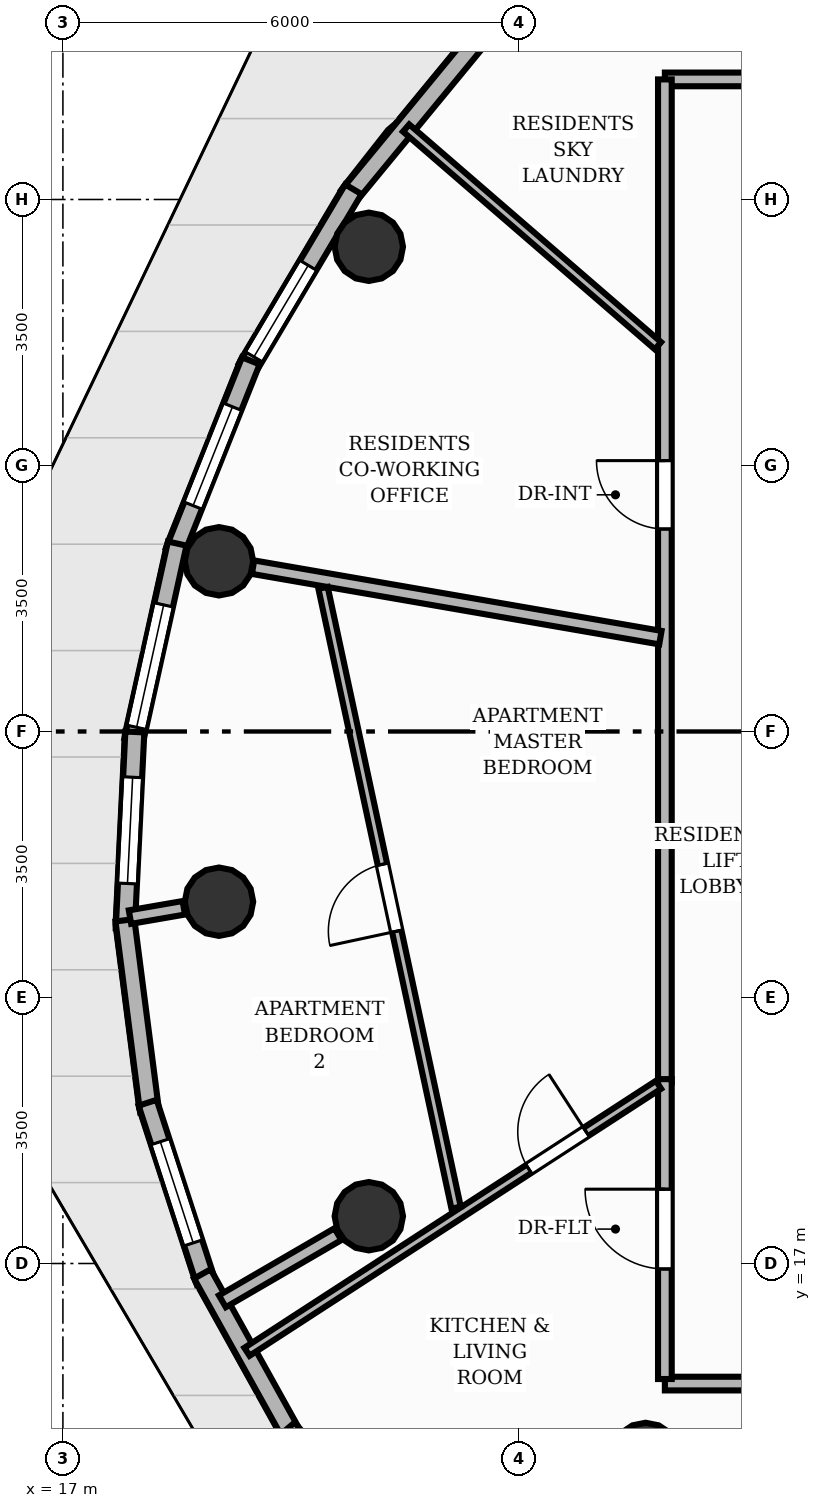
"""IFC4 building model, lengths in metres.
Left out: names, types, materials, properties, quantities, classifications, styles, units other than length and angle.
Written with IfcOpenShell. Run it as: python <this file> out.ifc"""

import sys

from ifc_helpers import new_model, si_unit, direction, frame, frame_2d, origin, origin_2d, place, context, subcontext, project, spatial, rectangle, circle, extrude, element, fill, save


model = new_model("IFC4")
c1 = context("Model", 3, precision=1e-05, world=origin(), true_north=direction((0.0, 1.0)))
c2 = subcontext(c1, "Body", "Model", "MODEL_VIEW")
j1 = project(units=[si_unit("LENGTHUNIT", "METRE"), si_unit("PLANEANGLEUNIT", "RADIAN")], contexts=[c1])
p1 = place(None, origin())
s1 = spatial("IfcSite", under=j1, at=p1, CompositionType="ELEMENT")
p2 = place(p1, origin())
s2 = spatial("IfcBuilding", under=s1, at=p2, CompositionType="ELEMENT")
p3 = place(p2, frame((0.0, 0.0, 191.84)))
s3 = spatial("IfcBuildingStorey", under=s2, at=p3, CompositionType="ELEMENT", Elevation=191.84)
for number, where, z_axis, x_axis in (
    (1, (21.025, 30.378, 0.0), (0.0, 0.0, 1.0), (1.0, 0.0, 0.0)),
    (2, (19.054, 26.24, 0.0), (0.0, 0.0, 1.0), (1.0, 0.0, 0.0)),
    (3, (19.054, 21.76, 0.0), (0.0, 0.0, 1.0), (1.0, 0.0, 0.0)),
    (4, (21.025, 17.622, 0.0), (0.0, 0.0, 1.0), (1.0, 0.0, 0.0)),
    (5, (24.667, 14.455, 0.0), (0.0, 0.0, 1.0), (1.0, 0.0, 0.0)),
):
    element("IfcColumn", number, at=place(p3, frame(where, z_axis=z_axis, x_axis=x_axis)), inside=s3, PredefinedType="COLUMN", context=c2, shape_type="SweptSolid", body=[
        extrude(circle(Radius=0.45, at=origin_2d()), origin(), (0.0, 0.0, 1.0), 3.2),
    ])
p4 = place(p3, frame((20.759, 31.045, 0.0), z_axis=(0.0, 0.0, 1.0), x_axis=(0.635409334306, 0.772175483861, 0.0)))
e6 = element("IfcWall", 6, at=p4, inside=s3, PredefinedType="SOLIDWALL", context=c2, shape_type="SweptSolid", body=[
    extrude(rectangle(XDim=2.758, YDim=0.25, at=frame_2d((1.379, 0.0))), origin(), (0.0, 0.0, 1.0), 2.96),
])
p5 = place(p3, frame((19.424, 28.779, 0.0), z_axis=(0.0, 0.0, 1.0), x_axis=(0.510320389621, 0.859984360287, 0.0)))
e7 = element("IfcWall", 7, at=p5, inside=s3, PredefinedType="SOLIDWALL", context=c2, shape_type="SweptSolid", body=[
    extrude(rectangle(XDim=2.738, YDim=0.25, at=frame_2d((1.369, 0.0))), origin(), (0.0, 0.0, 1.0), 2.96),
])
p6 = place(p5, frame((0.175, 0.0, 0.85)))
e8 = element("IfcOpeningElement", 8, at=p6, cuts=e7, PredefinedType="OPENING", context=c2, shape_type="SweptSolid", body=[
    extrude(rectangle(XDim=1.4, YDim=1.55, at=frame_2d((0.7, 0.775))), frame((0.0, 0.135, 0.0), z_axis=(0.0, -1.0, 0.0), x_axis=(1.0, 0.0, 0.0)), (0.0, 0.0, 1.0), 0.27),
])
p7 = place(p3, frame((18.472, 26.367, 0.0), z_axis=(0.0, 0.0, 1.0), x_axis=(0.370330939431, 0.928899884433, 0.0)))
e9 = element("IfcWall", 9, at=p7, inside=s3, PredefinedType="SOLIDWALL", context=c2, shape_type="SweptSolid", body=[
    extrude(rectangle(XDim=2.702, YDim=0.25, at=frame_2d((1.351, 0.0))), origin(), (0.0, 0.0, 1.0), 2.96),
])
p8 = place(p7, frame((0.651, 0.0, 0.85)))
e10 = element("IfcOpeningElement", 10, at=p8, cuts=e9, PredefinedType="OPENING", context=c2, shape_type="SweptSolid", body=[
    extrude(rectangle(XDim=1.4, YDim=1.55, at=frame_2d((0.7, 0.775))), frame((0.0, 0.135, 0.0), z_axis=(0.0, -1.0, 0.0), x_axis=(1.0, 0.0, 0.0)), (0.0, 0.0, 1.0), 0.27),
])
p9 = place(p3, frame((17.932, 23.884, 0.0), z_axis=(0.0, 0.0, 1.0), x_axis=(0.215877166516, 0.976420528756, 0.0)))
e11 = element("IfcWall", 11, at=p9, inside=s3, PredefinedType="SOLIDWALL", context=c2, shape_type="SweptSolid", body=[
    extrude(rectangle(XDim=2.651, YDim=0.25, at=frame_2d((1.325, 0.0))), origin(), (0.0, 0.0, 1.0), 2.96),
])
p10 = place(p9, frame((0.175, 0.0, 0.85)))
e12 = element("IfcOpeningElement", 12, at=p10, cuts=e11, PredefinedType="OPENING", context=c2, shape_type="SweptSolid", body=[
    extrude(rectangle(XDim=1.65, YDim=1.55, at=frame_2d((0.825, 0.775))), frame((0.0, 0.135, 0.0), z_axis=(0.0, -1.0, 0.0), x_axis=(1.0, 0.0, 0.0)), (0.0, 0.0, 1.0), 0.27),
])
p11 = place(p3, frame((17.82, 21.405, 0.0), z_axis=(0.0, 0.0, 1.0), x_axis=(0.048688181414, 0.99881402723, 0.0)))
e13 = element("IfcWall", 13, at=p11, inside=s3, PredefinedType="SOLIDWALL", context=c2, shape_type="SweptSolid", body=[
    extrude(rectangle(XDim=2.593, YDim=0.25, at=frame_2d((1.296, 0.0))), origin(), (0.0, 0.0, 1.0), 2.96),
])
p12 = place(p11, frame((0.596, 0.0, 0.85)))
e14 = element("IfcOpeningElement", 14, at=p12, cuts=e13, PredefinedType="OPENING", context=c2, shape_type="SweptSolid", body=[
    extrude(rectangle(XDim=1.4, YDim=1.55, at=frame_2d((0.7, 0.775))), frame((0.0, 0.135, 0.0), z_axis=(0.0, -1.0, 0.0), x_axis=(1.0, 0.0, 0.0)), (0.0, 0.0, 1.0), 0.27),
])
p13 = place(p3, frame((18.14, 19.005, 0.0), z_axis=(0.0, 0.0, 1.0), x_axis=(-0.128057007482, 0.991766808698, 0.0)))
e15 = element("IfcWall", 15, at=p13, inside=s3, PredefinedType="SOLIDWALL", context=c2, shape_type="SweptSolid", body=[
    extrude(rectangle(XDim=2.532, YDim=0.25, at=frame_2d((1.266, 0.0))), origin(), (0.0, 0.0, 1.0), 2.96),
])
p14 = place(p3, frame((18.881, 16.759, 0.0), z_axis=(0.0, 0.0, 1.0), x_axis=(-0.309005861828, 0.951060133407, 0.0)))
e16 = element("IfcWall", 16, at=p14, inside=s3, PredefinedType="SOLIDWALL", context=c2, shape_type="SweptSolid", body=[
    extrude(rectangle(XDim=2.478, YDim=0.25, at=frame_2d((1.239, 0.0))), origin(), (0.0, 0.0, 1.0), 2.96),
])
p15 = place(p14, frame((0.539, 0.0, 0.85)))
e17 = element("IfcOpeningElement", 17, at=p15, cuts=e16, PredefinedType="OPENING", context=c2, shape_type="SweptSolid", body=[
    extrude(rectangle(XDim=1.4, YDim=1.55, at=frame_2d((0.7, 0.775))), frame((0.0, 0.135, 0.0), z_axis=(0.0, -1.0, 0.0), x_axis=(1.0, 0.0, 0.0)), (0.0, 0.0, 1.0), 0.27),
])
p16 = place(p3, frame((20.019, 14.733, 0.0), z_axis=(0.0, 0.0, 1.0), x_axis=(-0.485821561791, 0.874058013005, 0.0)))
e18 = element("IfcWall", 18, at=p16, inside=s3, PredefinedType="SOLIDWALL", context=c2, shape_type="SweptSolid", body=[
    extrude(rectangle(XDim=2.437, YDim=0.25, at=frame_2d((1.218, 0.0))), origin(), (0.0, 0.0, 1.0), 2.96),
])
p17 = place(p3, frame((21.521, 12.99, 0.0), z_axis=(0.0, 0.0, 1.0), x_axis=(-0.648874307696, 0.760895612297, 0.0)))
e19 = element("IfcWall", 19, at=p17, inside=s3, PredefinedType="SOLIDWALL", context=c2, shape_type="SweptSolid", body=[
    extrude(rectangle(XDim=2.415, YDim=0.25, at=frame_2d((1.208, 0.0))), origin(), (0.0, 0.0, 1.0), 2.96),
])
p18 = place(p17, frame((0.632, 0.0, 0.0)))
e20 = element("IfcOpeningElement", 20, at=p18, cuts=e19, PredefinedType="OPENING", context=c2, shape_type="SweptSolid", body=[
    extrude(rectangle(XDim=1.15, YDim=2.2, at=frame_2d((0.575, 1.1))), frame((0.0, 0.135, 0.0), z_axis=(0.0, -1.0, 0.0), x_axis=(1.0, 0.0, 0.0)), (0.0, 0.0, 1.0), 0.27),
])
p19 = place(p3, frame((18.591, 21.68, 0.0), z_axis=(0.0, 0.0, 1.0), x_axis=(-0.985336223431, -0.170623933826, 0.0)))
e21 = element("IfcWall", 21, at=p19, inside=s3, PredefinedType="PARTITIONING", context=c2, shape_type="SweptSolid", body=[
    extrude(rectangle(XDim=0.718, YDim=0.18, at=frame_2d((0.359, 0.0))), origin(), (0.0, 0.0, 1.0), 2.403),
])
p20 = place(p3, frame((20.618, 17.386, 0.0), z_axis=(0.0, 0.0, 1.0), x_axis=(-0.86461381872, -0.502437005482, 0.0)))
e22 = element("IfcWall", 22, at=p20, inside=s3, PredefinedType="PARTITIONING", context=c2, shape_type="SweptSolid", body=[
    extrude(rectangle(XDim=1.758, YDim=0.18, at=frame_2d((0.879, 0.0))), origin(), (0.0, 0.0, 1.0), 2.403),
])
p21 = place(p3, frame((24.92, 32.58, 0.0), z_axis=(0.0, 0.0, 1.0), x_axis=(1.0, 0.0, 0.0)))
e23 = element("IfcWall", 23, at=p21, inside=s3, PredefinedType="PARTITIONING", context=c2, shape_type="SweptSolid", body=[
    extrude(rectangle(XDim=14.16, YDim=0.18, at=frame_2d((7.08, 0.0))), origin(), (0.0, 0.0, 1.0), 2.955),
])
p22 = place(p21, frame((8.186, 0.0, 0.0)))
e24 = element("IfcOpeningElement", 24, at=p22, cuts=e23, PredefinedType="OPENING", context=c2, shape_type="SweptSolid", body=[
    extrude(rectangle(XDim=1.05, YDim=2.15, at=frame_2d((0.525, 1.075))), frame((0.0, 0.1, 0.0), z_axis=(0.0, -1.0, 0.0), x_axis=(1.0, 0.0, 0.0)), (0.0, 0.0, 1.0), 0.2),
])
p23 = place(p21, frame((2.119, 0.0, 0.0)))
e25 = element("IfcOpeningElement", 25, at=p23, cuts=e23, PredefinedType="OPENING", context=c2, shape_type="SweptSolid", body=[
    extrude(rectangle(XDim=0.9, YDim=2.1, at=frame_2d((0.45, 1.05))), frame((0.0, 0.1, 0.0), z_axis=(0.0, -1.0, 0.0), x_axis=(1.0, 0.0, 0.0)), (0.0, 0.0, 1.0), 0.2),
])
p24 = place(p3, frame((24.92, 19.382, 0.0), z_axis=(0.0, 0.0, 1.0), x_axis=(0.0, 1.0, 0.0)))
e26 = element("IfcWall", 26, at=p24, inside=s3, PredefinedType="PARTITIONING", context=c2, shape_type="SweptSolid", body=[
    extrude(rectangle(XDim=13.198, YDim=0.18, at=frame_2d((6.599, 0.0))), origin(), (0.0, 0.0, 1.0), 2.955),
])
p25 = place(p24, frame((7.282, 0.0, 0.0)))
e27 = element("IfcOpeningElement", 27, at=p25, cuts=e26, PredefinedType="OPENING", context=c2, shape_type="SweptSolid", body=[
    extrude(rectangle(XDim=0.9, YDim=2.1, at=frame_2d((0.45, 1.05))), frame((0.0, 0.1, 0.0), z_axis=(0.0, -1.0, 0.0), x_axis=(1.0, 0.0, 0.0)), (0.0, 0.0, 1.0), 0.2),
])
p26 = place(p3, frame((28.531, 15.42, 0.0), z_axis=(0.0, 0.0, 1.0), x_axis=(-1.0, 0.0, 0.0)))
e28 = element("IfcWall", 28, at=p26, inside=s3, PredefinedType="PARTITIONING", context=c2, shape_type="SweptSolid", body=[
    extrude(rectangle(XDim=3.611, YDim=0.18, at=frame_2d((1.805, 0.0))), origin(), (0.0, 0.0, 1.0), 2.955),
])
p27 = place(p3, frame((24.92, 15.48, 0.0), z_axis=(0.0, 0.0, 1.0), x_axis=(0.0, 1.0, 0.0)))
e29 = element("IfcWall", 29, at=p27, inside=s3, PredefinedType="PARTITIONING", context=c2, shape_type="SweptSolid", body=[
    extrude(rectangle(XDim=3.946, YDim=0.18, at=frame_2d((1.973, 0.0))), origin(), (0.0, 0.0, 1.0), 2.955),
])
p28 = place(p27, frame((1.448, 0.0, 0.0)))
e30 = element("IfcOpeningElement", 30, at=p28, cuts=e29, PredefinedType="OPENING", context=c2, shape_type="SweptSolid", body=[
    extrude(rectangle(XDim=1.05, YDim=2.15, at=frame_2d((0.525, 1.075))), frame((0.0, 0.1, 0.0), z_axis=(0.0, -1.0, 0.0), x_axis=(1.0, 0.0, 0.0)), (0.0, 0.0, 1.0), 0.2),
])
p29 = place(p3, frame((21.515, 31.941, 0.0), z_axis=(0.0, 0.0, 1.0), x_axis=(0.756468247818, -0.654030419815, 0.0)))
e31 = element("IfcWall", 31, at=p29, inside=s3, PredefinedType="PARTITIONING", context=c2, shape_type="SweptSolid", body=[
    extrude(rectangle(XDim=4.381, YDim=0.125, at=frame_2d((2.19, 0.0))), origin(), (0.0, 0.0, 1.0), 2.692),
])
p30 = place(p3, frame((24.861, 25.235, 0.0), z_axis=(0.0, 0.0, 1.0), x_axis=(-0.985368487575, 0.170437506711, 0.0)))
e32 = element("IfcWall", 32, at=p30, inside=s3, PredefinedType="PARTITIONING", context=c2, shape_type="SweptSolid", body=[
    extrude(rectangle(XDim=5.439, YDim=0.18, at=frame_2d((2.719, 0.0))), origin(), (0.0, 0.0, 1.0), 2.403),
])
p31 = place(p3, frame((28.452, 15.339, 0.0), z_axis=(0.0, 0.0, 1.0), x_axis=(-0.583489481732, -0.812120695899, 0.0)))
e33 = element("IfcWall", 33, at=p31, inside=s3, PredefinedType="PLUMBINGWALL", context=c2, shape_type="SweptSolid", body=[
    extrude(rectangle(XDim=5.698, YDim=0.16, at=frame_2d((2.849, 0.0))), origin(), (0.0, 0.0, 1.0), 2.692),
])
p32 = place(p31, frame((2.399, 0.0, 0.0)))
e34 = element("IfcOpeningElement", 34, at=p32, cuts=e33, PredefinedType="OPENING", context=c2, shape_type="SweptSolid", body=[
    extrude(rectangle(XDim=0.9, YDim=2.1, at=frame_2d((0.45, 1.05))), frame((0.0, 0.09, 0.0), z_axis=(0.0, -1.0, 0.0), x_axis=(1.0, 0.0, 0.0)), (0.0, 0.0, 1.0), 0.18),
])
p33 = place(p3, frame((19.422, 15.838, 0.0), z_axis=(0.0, 0.0, 1.0), x_axis=(0.838876327826, 0.544322061479, 0.0)))
e35 = element("IfcWall", 35, at=p33, inside=s3, PredefinedType="PARTITIONING", context=c2, shape_type="SweptSolid", body=[
    extrude(rectangle(XDim=6.454, YDim=0.125, at=frame_2d((3.227, 0.0))), origin(), (0.0, 0.0, 1.0), 2.955),
])
p34 = place(p33, frame((4.419, 0.0, 0.0)))
e36 = element("IfcOpeningElement", 36, at=p34, cuts=e35, PredefinedType="OPENING", context=c2, shape_type="SweptSolid", body=[
    extrude(rectangle(XDim=0.9, YDim=2.1, at=frame_2d((0.45, 1.05))), frame((0.0, 0.073, 0.0), z_axis=(0.0, -1.0, 0.0), x_axis=(1.0, 0.0, 0.0)), (0.0, 0.0, 1.0), 0.145),
])
p35 = place(p3, frame((22.173, 17.735, 0.0), z_axis=(0.0, 0.0, 1.0), x_axis=(-0.20987090056, 0.977729106194, 0.0)))
e37 = element("IfcWall", 37, at=p35, inside=s3, PredefinedType="PARTITIONING", context=c2, shape_type="SweptSolid", body=[
    extrude(rectangle(XDim=8.341, YDim=0.125, at=frame_2d((4.17, 0.0))), origin(), (0.0, 0.0, 1.0), 2.955),
])
p36 = place(p35, frame((3.72, 0.0, 0.0)))
e38 = element("IfcOpeningElement", 38, at=p36, cuts=e37, PredefinedType="OPENING", context=c2, shape_type="SweptSolid", body=[
    extrude(rectangle(XDim=0.9, YDim=2.1, at=frame_2d((0.45, 1.05))), frame((0.0, 0.073, 0.0), z_axis=(0.0, -1.0, 0.0), x_axis=(1.0, 0.0, 0.0)), (0.0, 0.0, 1.0), 0.145),
])
p37 = place(p6, origin())
e39 = element("IfcWindow", 39, at=p37, inside=s3, PartitioningType="SINGLE_PANEL", PredefinedType="WINDOW", context=c2, shape_type="SweptSolid", body=[
    extrude(rectangle(XDim=1.4, YDim=1.55, at=frame_2d((0.7, 0.775))), frame((0.0, 0.03, 0.0), z_axis=(0.0, -1.0, 0.0), x_axis=(1.0, 0.0, 0.0)), (0.0, 0.0, 1.0), 0.06),
])
fill(e8, e39)
p38 = place(p8, origin())
e40 = element("IfcWindow", 40, at=p38, inside=s3, PartitioningType="SINGLE_PANEL", PredefinedType="WINDOW", context=c2, shape_type="SweptSolid", body=[
    extrude(rectangle(XDim=1.4, YDim=1.55, at=frame_2d((0.7, 0.775))), frame((0.0, 0.03, 0.0), z_axis=(0.0, -1.0, 0.0), x_axis=(1.0, 0.0, 0.0)), (0.0, 0.0, 1.0), 0.06),
])
fill(e10, e40)
p39 = place(p10, origin())
e41 = element("IfcWindow", 41, at=p39, inside=s3, PartitioningType="SINGLE_PANEL", PredefinedType="WINDOW", context=c2, shape_type="SweptSolid", body=[
    extrude(rectangle(XDim=1.65, YDim=1.55, at=frame_2d((0.825, 0.775))), frame((0.0, 0.03, 0.0), z_axis=(0.0, -1.0, 0.0), x_axis=(1.0, 0.0, 0.0)), (0.0, 0.0, 1.0), 0.06),
])
fill(e12, e41)
p40 = place(p12, origin())
e42 = element("IfcWindow", 42, at=p40, inside=s3, PartitioningType="SINGLE_PANEL", PredefinedType="WINDOW", context=c2, shape_type="SweptSolid", body=[
    extrude(rectangle(XDim=1.4, YDim=1.55, at=frame_2d((0.7, 0.775))), frame((0.0, 0.03, 0.0), z_axis=(0.0, -1.0, 0.0), x_axis=(1.0, 0.0, 0.0)), (0.0, 0.0, 1.0), 0.06),
])
fill(e14, e42)
p41 = place(p15, origin())
e43 = element("IfcWindow", 43, at=p41, inside=s3, PartitioningType="SINGLE_PANEL", PredefinedType="WINDOW", context=c2, shape_type="SweptSolid", body=[
    extrude(rectangle(XDim=1.4, YDim=1.55, at=frame_2d((0.7, 0.775))), frame((0.0, 0.03, 0.0), z_axis=(0.0, -1.0, 0.0), x_axis=(1.0, 0.0, 0.0)), (0.0, 0.0, 1.0), 0.06),
])
fill(e17, e43)
p42 = place(p25, origin())
e44 = element("IfcDoor", 44, at=p42, inside=s3, OperationType="SINGLE_SWING_RIGHT", PredefinedType="DOOR", context=c2, shape_type="SweptSolid", body=[
    extrude(rectangle(XDim=0.9, YDim=2.1, at=frame_2d((0.45, 1.05))), frame((0.0, 0.025, 0.0), z_axis=(0.0, -1.0, 0.0), x_axis=(1.0, 0.0, 0.0)), (0.0, 0.0, 1.0), 0.05),
])
fill(e27, e44)
p43 = place(p28, origin())
e45 = element("IfcDoor", 45, at=p43, inside=s3, OperationType="SINGLE_SWING_RIGHT", PredefinedType="DOOR", context=c2, shape_type="SweptSolid", body=[
    extrude(rectangle(XDim=1.05, YDim=2.15, at=frame_2d((0.525, 1.075))), frame((0.0, 0.025, 0.0), z_axis=(0.0, -1.0, 0.0), x_axis=(1.0, 0.0, 0.0)), (0.0, 0.0, 1.0), 0.05),
])
fill(e30, e45)
p44 = place(p34, origin())
e46 = element("IfcDoor", 46, at=p44, inside=s3, OperationType="SINGLE_SWING_RIGHT", PredefinedType="DOOR", context=c2, shape_type="SweptSolid", body=[
    extrude(rectangle(XDim=0.9, YDim=2.1, at=frame_2d((0.45, 1.05))), frame((0.0, 0.025, 0.0), z_axis=(0.0, -1.0, 0.0), x_axis=(1.0, 0.0, 0.0)), (0.0, 0.0, 1.0), 0.05),
])
fill(e36, e46)
p45 = place(p36, origin())
e47 = element("IfcDoor", 47, at=p45, inside=s3, OperationType="SINGLE_SWING_LEFT", PredefinedType="DOOR", context=c2, shape_type="SweptSolid", body=[
    extrude(rectangle(XDim=0.9, YDim=2.1, at=frame_2d((0.45, 1.05))), frame((0.0, 0.025, 0.0), z_axis=(0.0, -1.0, 0.0), x_axis=(1.0, 0.0, 0.0)), (0.0, 0.0, 1.0), 0.05),
])
fill(e38, e47)
save(model, sys.argv[1])
